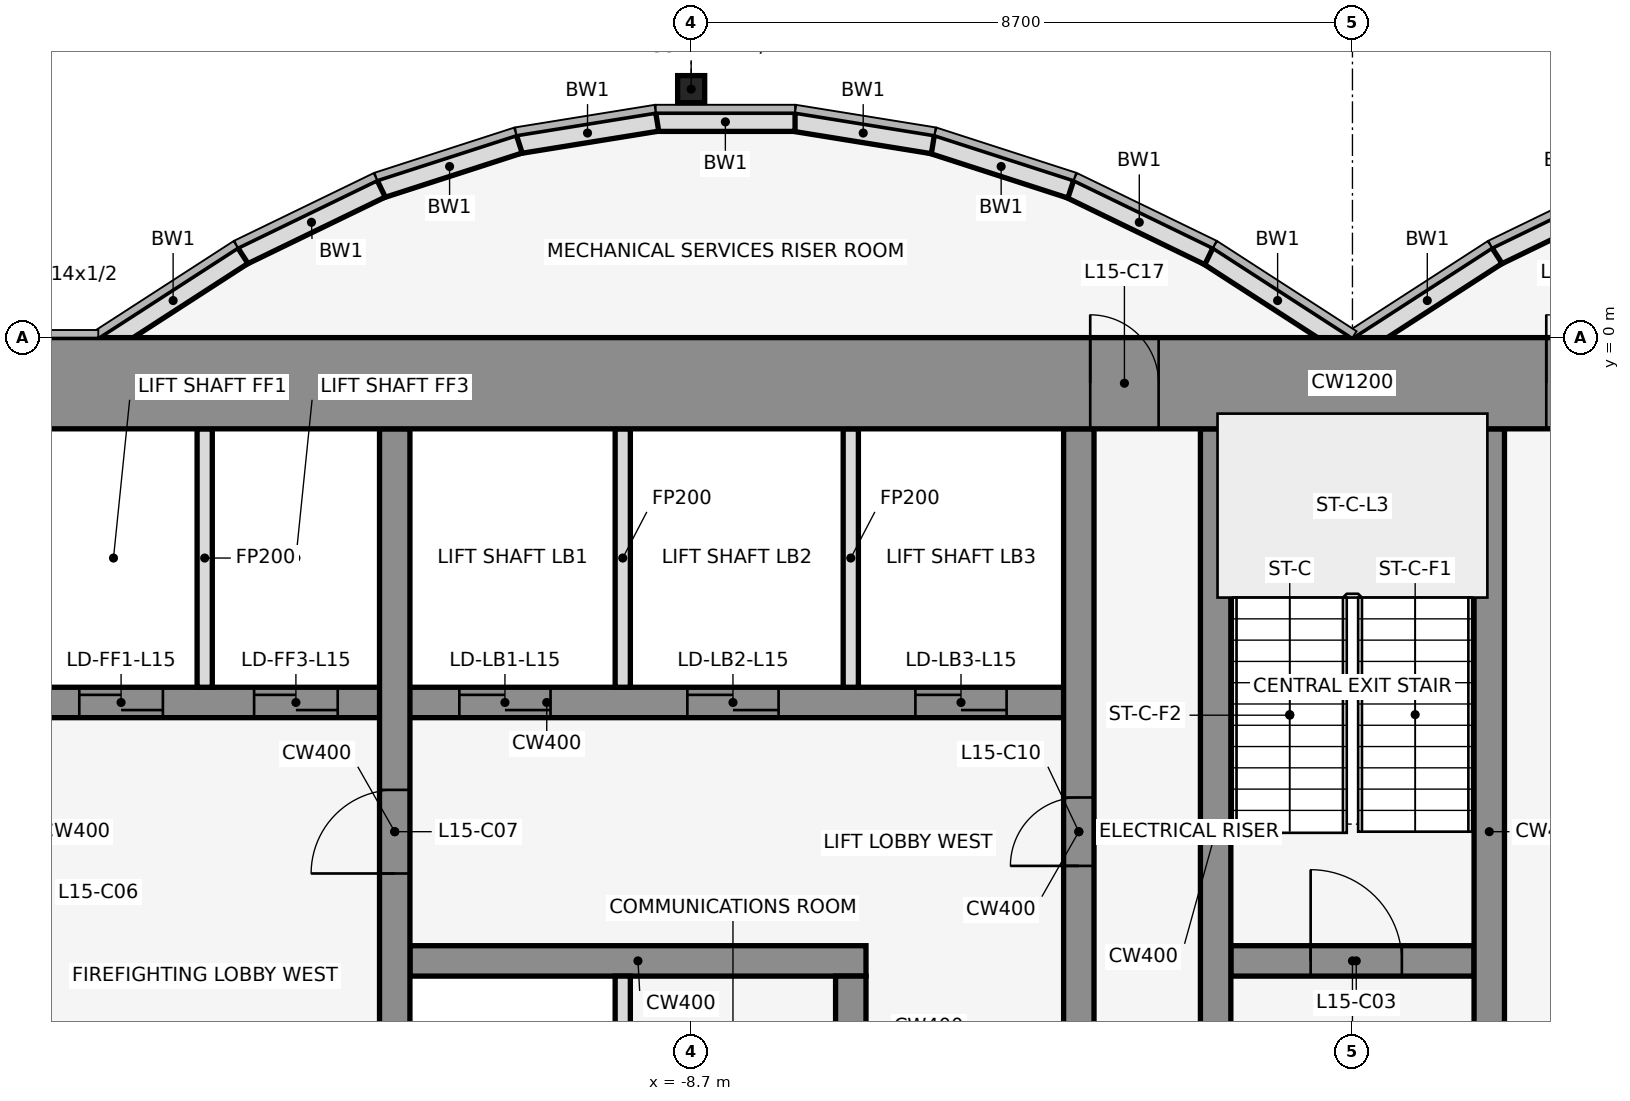
"""IFC4 building model, lengths in metres.
Left out: names, types, materials, properties, quantities, classifications, styles, units other than length and angle.
Written with IfcOpenShell. Run it as: python <this file> out.ifc"""

import sys

from ifc_helpers import new_model, si_unit, direction, frame, frame_2d, origin, origin_2d, place, context, subcontext, project, spatial, rectangle, hollow_rectangle, extrude, element, fill, save


model = new_model("IFC4")
c1 = context("Model", 3, precision=1e-05, world=origin(), true_north=direction((0.0, 1.0)))
c2 = subcontext(c1, "Body", "Model", "MODEL_VIEW")
j1 = project(units=[si_unit("LENGTHUNIT", "METRE"), si_unit("PLANEANGLEUNIT", "RADIAN")], contexts=[c1])
p1 = place(None, origin())
s1 = spatial("IfcSite", under=j1, at=p1, CompositionType="ELEMENT")
p2 = place(p1, origin())
s2 = spatial("IfcBuilding", under=s1, at=p2, CompositionType="ELEMENT")
p3 = place(p2, frame((0.0, 0.0, 75.5)))
s3 = spatial("IfcBuildingStorey", under=s2, at=p3, CompositionType="ELEMENT", Elevation=75.5)
p4 = place(p3, frame((-8.7, 3.269, 0.0), z_axis=(0.0, 0.0, 1.0), x_axis=(1.0, 0.0, 0.0)))
e1 = element("IfcColumn", 1, at=p4, inside=s3, PredefinedType="COLUMN", context=c2, shape_type="SweptSolid", body=[
    extrude(hollow_rectangle(XDim=0.356, YDim=0.356, WallThickness=0.012, at=origin_2d()), origin(), (0.0, 0.0, 1.0), 4.5),
])
p5 = place(p3, frame((3.721, 1.962, 0.0), z_axis=(0.0, 0.0, 1.0), x_axis=(-0.89982408427, -0.436252928206, 0.0)))
e2 = element("IfcWall", 2, at=p5, inside=s3, PredefinedType="STANDARD", context=c2, shape_type="SweptSolid", body=[
    extrude(rectangle(XDim=2.038, YDim=0.25, at=frame_2d((1.019, 0.0))), origin(), (0.0, 0.0, 1.0), 4.35),
])
for number, where, z_axis, x_axis in (
    (3, (1.901, 1.08, 0.0), (0.0, 0.0, 1.0), (-0.84, -0.543, 0.0)),
    (4, (-0.068, -0.105, 0.0), (0.0, 0.0, 1.0), (-0.84, 0.543, 0.0)),
):
    element("IfcWall", number, at=place(p3, frame(where, z_axis=z_axis, x_axis=x_axis)), inside=s3, PredefinedType="STANDARD", context=c2, shape_type="SweptSolid", body=[
        extrude(rectangle(XDim=2.183, YDim=0.25, at=frame_2d((1.091, 0.0))), origin(), (0.0, 0.0, 1.0), 4.35),
    ])
p6 = place(p3, frame((-1.888, 1.073, 0.0), z_axis=(0.0, 0.0, 1.0), x_axis=(-0.89982408427, 0.436252928206, 0.0)))
e5 = element("IfcWall", 5, at=p6, inside=s3, PredefinedType="STANDARD", context=c2, shape_type="SweptSolid", body=[
    extrude(rectangle(XDim=2.038, YDim=0.25, at=frame_2d((1.019, 0.0))), origin(), (0.0, 0.0, 1.0), 4.35),
])
p7 = place(p3, frame((-3.705, 1.955, 0.0), z_axis=(0.0, 0.0, 1.0), x_axis=(-0.951495806175, 0.307661714928, 0.0)))
e6 = element("IfcWall", 6, at=p7, inside=s3, PredefinedType="STANDARD", context=c2, shape_type="SweptSolid", body=[
    extrude(rectangle(XDim=1.927, YDim=0.25, at=frame_2d((0.963, 0.0))), origin(), (0.0, 0.0, 1.0), 4.35),
])
p8 = place(p3, frame((-5.52, 2.543, 0.0), z_axis=(0.0, 0.0, 1.0), x_axis=(-0.987181718931, 0.159600293885, 0.0)))
e7 = element("IfcWall", 7, at=p8, inside=s3, PredefinedType="STANDARD", context=c2, shape_type="SweptSolid", body=[
    extrude(rectangle(XDim=1.857, YDim=0.25, at=frame_2d((0.929, 0.0))), origin(), (0.0, 0.0, 1.0), 4.35),
])
p9 = place(p3, frame((-7.333, 2.838, 0.0), z_axis=(0.0, 0.0, 1.0), x_axis=(-1.0, 0.0, 0.0)))
e8 = element("IfcWall", 8, at=p9, inside=s3, PredefinedType="STANDARD", context=c2, shape_type="SweptSolid", body=[
    extrude(rectangle(XDim=1.833, YDim=0.25, at=frame_2d((0.917, 0.0))), origin(), (0.0, 0.0, 1.0), 4.35),
])
p10 = place(p3, frame((-9.147, 2.84, 0.0), z_axis=(0.0, 0.0, 1.0), x_axis=(-0.987181718931, -0.159600293885, 0.0)))
e9 = element("IfcWall", 9, at=p10, inside=s3, PredefinedType="STANDARD", context=c2, shape_type="SweptSolid", body=[
    extrude(rectangle(XDim=1.857, YDim=0.25, at=frame_2d((0.929, 0.0))), origin(), (0.0, 0.0, 1.0), 4.35),
])
p11 = place(p3, frame((-10.962, 2.548, 0.0), z_axis=(0.0, 0.0, 1.0), x_axis=(-0.951495806175, -0.307661714928, 0.0)))
e10 = element("IfcWall", 10, at=p11, inside=s3, PredefinedType="STANDARD", context=c2, shape_type="SweptSolid", body=[
    extrude(rectangle(XDim=1.927, YDim=0.25, at=frame_2d((0.963, 0.0))), origin(), (0.0, 0.0, 1.0), 4.35),
])
p12 = place(p3, frame((-12.779, 1.962, 0.0), z_axis=(0.0, 0.0, 1.0), x_axis=(-0.89982408427, -0.436252928206, 0.0)))
e11 = element("IfcWall", 11, at=p12, inside=s3, PredefinedType="STANDARD", context=c2, shape_type="SweptSolid", body=[
    extrude(rectangle(XDim=2.038, YDim=0.25, at=frame_2d((1.019, 0.0))), origin(), (0.0, 0.0, 1.0), 4.35),
])
p13 = place(p3, frame((-14.599, 1.08, 0.0), z_axis=(0.0, 0.0, 1.0), x_axis=(-0.83981312244, -0.542875602121, 0.0)))
e12 = element("IfcWall", 12, at=p13, inside=s3, PredefinedType="STANDARD", context=c2, shape_type="SweptSolid", body=[
    extrude(rectangle(XDim=2.183, YDim=0.25, at=frame_2d((1.091, 0.0))), origin(), (0.0, 0.0, 1.0), 4.35),
])
p14 = place(p3, frame((-12.4, -8.2, 0.0), z_axis=(0.0, 0.0, 1.0), x_axis=(1.0, 0.0, 0.0)))
e13 = element("IfcWall", 13, at=p14, inside=s3, PredefinedType="SHEAR", context=c2, shape_type="SweptSolid", body=[
    extrude(rectangle(XDim=6.0, YDim=0.4, at=frame_2d((3.0, 0.0))), origin(), (0.0, 0.0, 1.0), 4.5),
])
p15 = place(p3, frame((-1.6, -8.2, 0.0), z_axis=(0.0, 0.0, 1.0), x_axis=(1.0, 0.0, 0.0)))
e14 = element("IfcWall", 14, at=p15, inside=s3, PredefinedType="SHEAR", context=c2, shape_type="SweptSolid", body=[
    extrude(rectangle(XDim=3.2, YDim=0.4, at=frame_2d((1.6, 0.0))), origin(), (0.0, 0.0, 1.0), 4.5),
])
p16 = place(p15, frame((1.05, 0.0, 0.0)))
e15 = element("IfcOpeningElement", 15, at=p16, cuts=e14, PredefinedType="OPENING", context=c2, shape_type="SweptSolid", body=[
    extrude(rectangle(XDim=1.2, YDim=2.1, at=frame_2d((0.6, 1.05))), frame((0.0, 0.212, 0.0), z_axis=(0.0, -1.0, 0.0), x_axis=(1.0, 0.0, 0.0)), (0.0, 0.0, 1.0), 0.424),
])
p17 = place(p3, frame((-17.4, -4.8, 0.0), z_axis=(0.0, 0.0, 1.0), x_axis=(1.0, 0.0, 0.0)))
e16 = element("IfcWall", 16, at=p17, inside=s3, PredefinedType="SHEAR", context=c2, shape_type="SweptSolid", body=[
    extrude(rectangle(XDim=13.6, YDim=0.4, at=frame_2d((6.8, 0.0))), origin(), (0.0, 0.0, 1.0), 4.5),
])
p18 = place(p17, frame((0.65, 0.0, 0.0)))
e17 = element("IfcOpeningElement", 17, at=p18, cuts=e16, PredefinedType="OPENING", context=c2, shape_type="SweptSolid", body=[
    extrude(rectangle(XDim=1.1, YDim=2.1, at=frame_2d((0.55, 1.05))), frame((0.0, 0.212, 0.0), z_axis=(0.0, -1.0, 0.0), x_axis=(1.0, 0.0, 0.0)), (0.0, 0.0, 1.0), 0.424),
])
p19 = place(p17, frame((2.95, 0.0, 0.0)))
e18 = element("IfcOpeningElement", 18, at=p19, cuts=e16, PredefinedType="OPENING", context=c2, shape_type="SweptSolid", body=[
    extrude(rectangle(XDim=1.1, YDim=2.1, at=frame_2d((0.55, 1.05))), frame((0.0, 0.212, 0.0), z_axis=(0.0, -1.0, 0.0), x_axis=(1.0, 0.0, 0.0)), (0.0, 0.0, 1.0), 0.424),
])
p20 = place(p17, frame((5.65, 0.0, 0.0)))
e19 = element("IfcOpeningElement", 19, at=p20, cuts=e16, PredefinedType="OPENING", context=c2, shape_type="SweptSolid", body=[
    extrude(rectangle(XDim=1.2, YDim=2.1, at=frame_2d((0.6, 1.05))), frame((0.0, 0.212, 0.0), z_axis=(0.0, -1.0, 0.0), x_axis=(1.0, 0.0, 0.0)), (0.0, 0.0, 1.0), 0.424),
])
p21 = place(p17, frame((8.65, 0.0, 0.0)))
e20 = element("IfcOpeningElement", 20, at=p21, cuts=e16, PredefinedType="OPENING", context=c2, shape_type="SweptSolid", body=[
    extrude(rectangle(XDim=1.2, YDim=2.1, at=frame_2d((0.6, 1.05))), frame((0.0, 0.212, 0.0), z_axis=(0.0, -1.0, 0.0), x_axis=(1.0, 0.0, 0.0)), (0.0, 0.0, 1.0), 0.424),
])
p22 = place(p17, frame((11.65, 0.0, 0.0)))
e21 = element("IfcOpeningElement", 21, at=p22, cuts=e16, PredefinedType="OPENING", context=c2, shape_type="SweptSolid", body=[
    extrude(rectangle(XDim=1.2, YDim=2.1, at=frame_2d((0.6, 1.05))), frame((0.0, 0.212, 0.0), z_axis=(0.0, -1.0, 0.0), x_axis=(1.0, 0.0, 0.0)), (0.0, 0.0, 1.0), 0.424),
])
p23 = place(p3, frame((-15.1, -4.6, 0.0), z_axis=(0.0, 0.0, 1.0), x_axis=(0.0, 1.0, 0.0)))
e22 = element("IfcWall", 22, at=p23, inside=s3, PredefinedType="PARTITIONING", context=c2, shape_type="SweptSolid", body=[
    extrude(rectangle(XDim=3.4, YDim=0.2, at=frame_2d((1.7, 0.0))), origin(), (0.0, 0.0, 1.0), 3.339),
])
p24 = place(p3, frame((-12.6, -11.8, 0.0), z_axis=(0.0, 0.0, 1.0), x_axis=(0.0, 1.0, 0.0)))
e23 = element("IfcWall", 23, at=p24, inside=s3, PredefinedType="SHEAR", context=c2, shape_type="SweptSolid", body=[
    extrude(rectangle(XDim=10.6, YDim=0.4, at=frame_2d((5.3, 0.0))), origin(), (0.0, 0.0, 1.0), 4.5),
])
p25 = place(p24, frame((4.75, 0.0, 0.0)))
e24 = element("IfcOpeningElement", 24, at=p25, cuts=e23, PredefinedType="OPENING", context=c2, shape_type="SweptSolid", body=[
    extrude(rectangle(XDim=1.1, YDim=2.1, at=frame_2d((0.55, 1.05))), frame((0.0, 0.212, 0.0), z_axis=(0.0, -1.0, 0.0), x_axis=(1.0, 0.0, 0.0)), (0.0, 0.0, 1.0), 0.424),
])
for number, where, z_axis, x_axis in (
    (25, (-9.6, -11.8, 0.0), (0.0, 0.0, 1.0), (0.0, 1.0, 0.0)),
    (26, (-9.6, -4.6, 0.0), (0.0, 0.0, 1.0), (0.0, 1.0, 0.0)),
):
    element("IfcWall", number, at=place(p3, frame(where, z_axis=z_axis, x_axis=x_axis)), inside=s3, PredefinedType="PARTITIONING", context=c2, shape_type="SweptSolid", body=[
        extrude(rectangle(XDim=3.4, YDim=0.2, at=frame_2d((1.7, 0.0))), origin(), (0.0, 0.0, 1.0), 3.339),
    ])
p26 = place(p3, frame((-6.6, -11.8, 0.0), z_axis=(0.0, 0.0, 1.0), x_axis=(0.0, 1.0, 0.0)))
e27 = element("IfcWall", 27, at=p26, inside=s3, PredefinedType="SHEAR", context=c2, shape_type="SweptSolid", body=[
    extrude(rectangle(XDim=3.4, YDim=0.4, at=frame_2d((1.7, 0.0))), origin(), (0.0, 0.0, 1.0), 4.5),
])
p27 = place(p26, frame((1.25, 0.0, 0.0)))
e28 = element("IfcOpeningElement", 28, at=p27, cuts=e27, PredefinedType="OPENING", context=c2, shape_type="SweptSolid", body=[
    extrude(rectangle(XDim=0.9, YDim=2.1, at=frame_2d((0.45, 1.05))), frame((0.0, 0.212, 0.0), z_axis=(0.0, -1.0, 0.0), x_axis=(1.0, 0.0, 0.0)), (0.0, 0.0, 1.0), 0.424),
])
p28 = place(p3, frame((-6.6, -4.6, 0.0), z_axis=(0.0, 0.0, 1.0), x_axis=(0.0, 1.0, 0.0)))
e29 = element("IfcWall", 29, at=p28, inside=s3, PredefinedType="PARTITIONING", context=c2, shape_type="SweptSolid", body=[
    extrude(rectangle(XDim=3.4, YDim=0.2, at=frame_2d((1.7, 0.0))), origin(), (0.0, 0.0, 1.0), 3.339),
])
p29 = place(p3, frame((-3.6, -11.8, 0.0), z_axis=(0.0, 0.0, 1.0), x_axis=(0.0, 1.0, 0.0)))
e30 = element("IfcWall", 30, at=p29, inside=s3, PredefinedType="SHEAR", context=c2, shape_type="SweptSolid", body=[
    extrude(rectangle(XDim=10.6, YDim=0.4, at=frame_2d((5.3, 0.0))), origin(), (0.0, 0.0, 1.0), 4.5),
])
p30 = place(p29, frame((4.85, 0.0, 0.0)))
e31 = element("IfcOpeningElement", 31, at=p30, cuts=e30, PredefinedType="OPENING", context=c2, shape_type="SweptSolid", body=[
    extrude(rectangle(XDim=0.9, YDim=2.1, at=frame_2d((0.45, 1.05))), frame((0.0, 0.212, 0.0), z_axis=(0.0, -1.0, 0.0), x_axis=(1.0, 0.0, 0.0)), (0.0, 0.0, 1.0), 0.424),
])
for number, where, z_axis, x_axis in (
    (32, (-1.8, -11.8, 0.0), (0.0, 0.0, 1.0), (0.0, 1.0, 0.0)),
    (33, (1.8, -11.8, 0.0), (0.0, 0.0, 1.0), (0.0, 1.0, 0.0)),
):
    element("IfcWall", number, at=place(p3, frame(where, z_axis=z_axis, x_axis=x_axis)), inside=s3, PredefinedType="SHEAR", context=c2, shape_type="SweptSolid", body=[
        extrude(rectangle(XDim=10.6, YDim=0.4, at=frame_2d((5.3, 0.0))), origin(), (0.0, 0.0, 1.0), 4.5),
    ])
p31 = place(p3, frame((-22.0, -0.6, 0.0), z_axis=(0.0, 0.0, 1.0), x_axis=(1.0, 0.0, 0.0)))
e34 = element("IfcWall", 34, at=p31, inside=s3, PredefinedType="SHEAR", context=c2, shape_type="SweptSolid", body=[
    extrude(rectangle(XDim=44.0, YDim=1.2, at=frame_2d((22.0, 0.0))), origin(), (0.0, 0.0, 1.0), 4.5),
])
p32 = place(p31, frame((18.55, 0.0, 0.0)))
e35 = element("IfcOpeningElement", 35, at=p32, cuts=e34, PredefinedType="OPENING", context=c2, shape_type="SweptSolid", body=[
    extrude(rectangle(XDim=0.9, YDim=2.1, at=frame_2d((0.45, 1.05))), frame((0.0, 0.612, 0.0), z_axis=(0.0, -1.0, 0.0), x_axis=(1.0, 0.0, 0.0)), (0.0, 0.0, 1.0), 1.224),
])
p33 = place(p31, frame((24.55, 0.0, 0.0)))
e36 = element("IfcOpeningElement", 36, at=p33, cuts=e34, PredefinedType="OPENING", context=c2, shape_type="SweptSolid", body=[
    extrude(rectangle(XDim=0.9, YDim=2.1, at=frame_2d((0.45, 1.05))), frame((0.0, 0.612, 0.0), z_axis=(0.0, -1.0, 0.0), x_axis=(1.0, 0.0, 0.0)), (0.0, 0.0, 1.0), 1.224),
])
p34 = place(p16, origin())
e37 = element("IfcDoor", 37, at=p34, inside=s3, OperationType="SINGLE_SWING_LEFT", PredefinedType="DOOR", context=c2, shape_type="SweptSolid", body=[
    extrude(rectangle(XDim=1.2, YDim=2.1, at=frame_2d((0.6, 1.05))), frame((0.0, 0.025, 0.0), z_axis=(0.0, -1.0, 0.0), x_axis=(1.0, 0.0, 0.0)), (0.0, 0.0, 1.0), 0.05),
])
fill(e15, e37)
p35 = place(p18, origin())
e38 = element("IfcDoor", 38, at=p35, inside=s3, OperationType="DOUBLE_DOOR_SLIDING", PredefinedType="DOOR", context=c2, shape_type="SweptSolid", body=[
    extrude(rectangle(XDim=1.1, YDim=2.1, at=frame_2d((0.55, 1.05))), frame((0.0, 0.025, 0.0), z_axis=(0.0, -1.0, 0.0), x_axis=(1.0, 0.0, 0.0)), (0.0, 0.0, 1.0), 0.05),
])
fill(e17, e38)
p36 = place(p19, origin())
e39 = element("IfcDoor", 39, at=p36, inside=s3, OperationType="DOUBLE_DOOR_SLIDING", PredefinedType="DOOR", context=c2, shape_type="SweptSolid", body=[
    extrude(rectangle(XDim=1.1, YDim=2.1, at=frame_2d((0.55, 1.05))), frame((0.0, 0.025, 0.0), z_axis=(0.0, -1.0, 0.0), x_axis=(1.0, 0.0, 0.0)), (0.0, 0.0, 1.0), 0.05),
])
fill(e18, e39)
p37 = place(p20, origin())
e40 = element("IfcDoor", 40, at=p37, inside=s3, OperationType="DOUBLE_DOOR_SLIDING", PredefinedType="DOOR", context=c2, shape_type="SweptSolid", body=[
    extrude(rectangle(XDim=1.2, YDim=2.1, at=frame_2d((0.6, 1.05))), frame((0.0, 0.025, 0.0), z_axis=(0.0, -1.0, 0.0), x_axis=(1.0, 0.0, 0.0)), (0.0, 0.0, 1.0), 0.05),
])
fill(e19, e40)
p38 = place(p21, origin())
e41 = element("IfcDoor", 41, at=p38, inside=s3, OperationType="DOUBLE_DOOR_SLIDING", PredefinedType="DOOR", context=c2, shape_type="SweptSolid", body=[
    extrude(rectangle(XDim=1.2, YDim=2.1, at=frame_2d((0.6, 1.05))), frame((0.0, 0.025, 0.0), z_axis=(0.0, -1.0, 0.0), x_axis=(1.0, 0.0, 0.0)), (0.0, 0.0, 1.0), 0.05),
])
fill(e20, e41)
p39 = place(p22, origin())
e42 = element("IfcDoor", 42, at=p39, inside=s3, OperationType="DOUBLE_DOOR_SLIDING", PredefinedType="DOOR", context=c2, shape_type="SweptSolid", body=[
    extrude(rectangle(XDim=1.2, YDim=2.1, at=frame_2d((0.6, 1.05))), frame((0.0, 0.025, 0.0), z_axis=(0.0, -1.0, 0.0), x_axis=(1.0, 0.0, 0.0)), (0.0, 0.0, 1.0), 0.05),
])
fill(e21, e42)
p40 = place(p25, origin())
e43 = element("IfcDoor", 43, at=p40, inside=s3, OperationType="SINGLE_SWING_LEFT", PredefinedType="DOOR", context=c2, shape_type="SweptSolid", body=[
    extrude(rectangle(XDim=1.1, YDim=2.1, at=frame_2d((0.55, 1.05))), frame((0.0, 0.025, 0.0), z_axis=(0.0, -1.0, 0.0), x_axis=(1.0, 0.0, 0.0)), (0.0, 0.0, 1.0), 0.05),
])
fill(e24, e43)
p41 = place(p30, frame((0.9, 0.0, 0.0), z_axis=(0.0, 0.0, 1.0), x_axis=(-1.0, 0.0, 0.0)))
e44 = element("IfcDoor", 44, at=p41, inside=s3, OperationType="SINGLE_SWING_LEFT", PredefinedType="DOOR", context=c2, shape_type="SweptSolid", body=[
    extrude(rectangle(XDim=0.9, YDim=2.1, at=frame_2d((0.45, 1.05))), frame((0.0, 0.025, 0.0), z_axis=(0.0, -1.0, 0.0), x_axis=(1.0, 0.0, 0.0)), (0.0, 0.0, 1.0), 0.05),
])
fill(e31, e44)
p42 = place(p32, origin())
e45 = element("IfcDoor", 45, at=p42, inside=s3, OperationType="SINGLE_SWING_LEFT", PredefinedType="DOOR", context=c2, shape_type="SweptSolid", body=[
    extrude(rectangle(XDim=0.9, YDim=2.1, at=frame_2d((0.45, 1.05))), frame((0.0, 0.025, 0.0), z_axis=(0.0, -1.0, 0.0), x_axis=(1.0, 0.0, 0.0)), (0.0, 0.0, 1.0), 0.05),
])
fill(e35, e45)
p43 = place(p33, origin())
e46 = element("IfcDoor", 46, at=p43, inside=s3, OperationType="SINGLE_SWING_LEFT", PredefinedType="DOOR", context=c2, shape_type="SweptSolid", body=[
    extrude(rectangle(XDim=0.9, YDim=2.1, at=frame_2d((0.45, 1.05))), frame((0.0, 0.025, 0.0), z_axis=(0.0, -1.0, 0.0), x_axis=(1.0, 0.0, 0.0)), (0.0, 0.0, 1.0), 0.05),
])
fill(e36, e46)
save(model, sys.argv[1])
